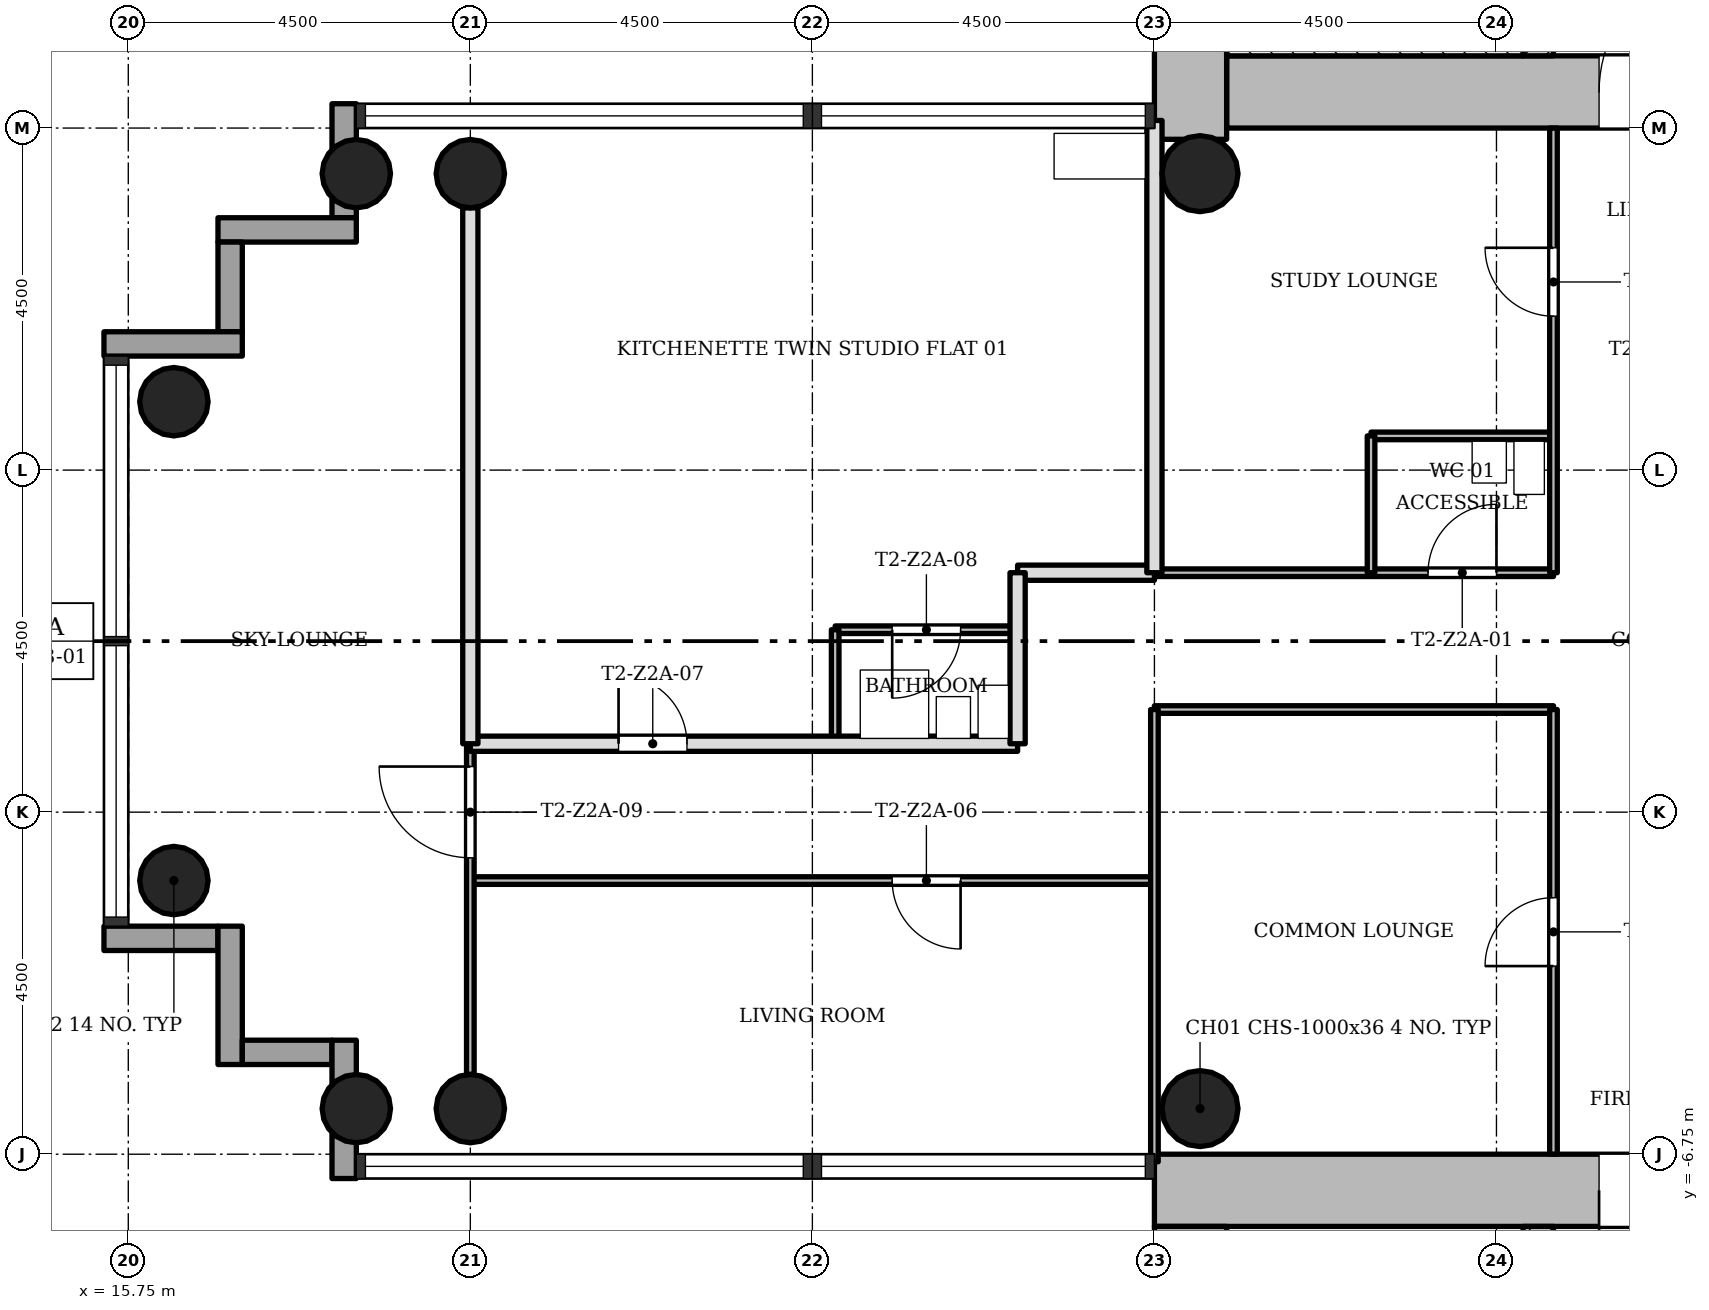
"""IFC4 building model, lengths in metres.
Left out: names, types, materials, properties, quantities, classifications, styles, units other than length and angle.
Written with IfcOpenShell. Run it as: python <this file> out.ifc"""

import sys

from ifc_helpers import new_model, si_unit, direction, frame, frame_2d, origin, origin_2d, place, context, subcontext, project, spatial, rectangle, hollow_circle, extrude, element, fill, save


model = new_model("IFC4")
c1 = context("Model", 3, precision=1e-05, world=origin(), true_north=direction((0.0, 1.0)))
c2 = subcontext(c1, "Body", "Model", "MODEL_VIEW")
j1 = project(units=[si_unit("LENGTHUNIT", "METRE"), si_unit("PLANEANGLEUNIT", "RADIAN")], contexts=[c1])
p1 = place(None, origin())
s1 = spatial("IfcSite", under=j1, at=p1, CompositionType="ELEMENT")
p2 = place(p1, origin())
s2 = spatial("IfcBuilding", under=s1, at=p2, CompositionType="ELEMENT")
p3 = place(p2, frame((0.0, 0.0, 117.4)))
s3 = spatial("IfcBuildingStorey", under=s2, at=p3, CompositionType="ELEMENT", Elevation=117.4)
p4 = place(p3, frame((30.2, 7.225, 0.0), z_axis=(0.0, 0.0, 1.0), x_axis=(1.0, 0.0, 0.0)))
e1 = element("IfcWall", 1, at=p4, inside=s3, PredefinedType="SHEAR", context=c2, shape_type="SweptSolid", body=[
    extrude(rectangle(XDim=12.55, YDim=0.95, at=frame_2d((6.275, 0.0))), origin(), (0.0, 0.0, 1.0), 3.4),
])
p5 = place(p4, frame((4.9, 0.0, 0.0)))
e2 = element("IfcOpeningElement", 2, at=p5, cuts=e1, PredefinedType="OPENING", context=c2, shape_type="SweptSolid", body=[
    extrude(rectangle(XDim=1.8, YDim=2.1, at=frame_2d((0.9, 1.05))), frame((0.0, 0.485, 0.0), z_axis=(0.0, -1.0, 0.0), x_axis=(1.0, 0.0, 0.0)), (0.0, 0.0, 1.0), 0.97),
])
p6 = place(p3, frame((29.725, 15.298, 0.0), z_axis=(0.0, 0.0, 1.0), x_axis=(0.0, -1.0, 0.0)))
e3 = element("IfcWall", 3, at=p6, inside=s3, PredefinedType="SHEAR", context=c2, shape_type="SweptSolid", body=[
    extrude(rectangle(XDim=8.696, YDim=0.95, at=frame_2d((4.348, 0.0))), origin(), (0.0, 0.0, 1.0), 3.4),
])
p7 = place(p3, frame((34.3, 7.7, 0.0), z_axis=(0.0, 0.0, 1.0), x_axis=(0.0, 1.0, 0.0)))
e4 = element("IfcWall", 4, at=p7, inside=s3, PredefinedType="SHEAR", context=c2, shape_type="SweptSolid", body=[
    extrude(rectangle(XDim=7.1, YDim=0.4, at=frame_2d((3.55, 0.0))), origin(), (0.0, 0.0, 1.0), 3.4),
])
p8 = place(p7, frame((0.7, 0.0, 0.0)))
e5 = element("IfcOpeningElement", 5, at=p8, cuts=e4, PredefinedType="OPENING", context=c2, shape_type="SweptSolid", body=[
    extrude(rectangle(XDim=0.9, YDim=2.1, at=frame_2d((0.45, 1.05))), frame((0.0, 0.21, 0.0), z_axis=(0.0, -1.0, 0.0), x_axis=(1.0, 0.0, 0.0)), (0.0, 0.0, 1.0), 0.42),
])
p9 = place(p3, frame((41.8, -7.225, 0.0), z_axis=(0.0, 0.0, 1.0), x_axis=(-1.0, 0.0, 0.0)))
e6 = element("IfcWall", 6, at=p9, inside=s3, PredefinedType="SHEAR", context=c2, shape_type="SweptSolid", body=[
    extrude(rectangle(XDim=12.55, YDim=0.95, at=frame_2d((6.275, 0.0))), origin(), (0.0, 0.0, 1.0), 3.4),
])
p10 = place(p9, frame((4.9, 0.0, 0.0)))
e7 = element("IfcOpeningElement", 7, at=p10, cuts=e6, PredefinedType="OPENING", context=c2, shape_type="SweptSolid", body=[
    extrude(rectangle(XDim=1.8, YDim=2.1, at=frame_2d((0.9, 1.05))), frame((0.0, 0.485, 0.0), z_axis=(0.0, -1.0, 0.0), x_axis=(1.0, 0.0, 0.0)), (0.0, 0.0, 1.0), 0.97),
])
p11 = place(p3, frame((29.725, -7.7, 0.0), z_axis=(0.0, 0.0, 1.0), x_axis=(0.0, -1.0, 0.0)))
e8 = element("IfcWall", 8, at=p11, inside=s3, PredefinedType="SHEAR", context=c2, shape_type="SweptSolid", body=[
    extrude(rectangle(XDim=8.05, YDim=0.95, at=frame_2d((4.025, 0.0))), origin(), (0.0, 0.0, 1.0), 3.4),
])
p12 = place(p3, frame((34.3, -14.8, 0.0), z_axis=(0.0, 0.0, 1.0), x_axis=(0.0, 1.0, 0.0)))
e9 = element("IfcWall", 9, at=p12, inside=s3, PredefinedType="SHEAR", context=c2, shape_type="SweptSolid", body=[
    extrude(rectangle(XDim=7.1, YDim=0.4, at=frame_2d((3.55, 0.0))), origin(), (0.0, 0.0, 1.0), 3.4),
])
p13 = place(p12, frame((5.2, 0.0, 0.0)))
e10 = element("IfcOpeningElement", 10, at=p13, cuts=e9, PredefinedType="OPENING", context=c2, shape_type="SweptSolid", body=[
    extrude(rectangle(XDim=1.1, YDim=2.1, at=frame_2d((0.55, 1.05))), frame((0.0, 0.21, 0.0), z_axis=(0.0, -1.0, 0.0), x_axis=(1.0, 0.0, 0.0)), (0.0, 0.0, 1.0), 0.42),
])
for number, where, z_axis, x_axis in (
    (11, (20.25, 6.15, 0.0), (0.0, 0.0, 1.0), (1.0, 0.0, 0.0)),
    (12, (20.25, -6.15, 0.0), (0.0, 0.0, 1.0), (1.0, 0.0, 0.0)),
    (13, (18.75, 6.15, 0.0), (0.0, 0.0, 1.0), (1.0, 0.0, 0.0)),
    (14, (18.75, -6.15, 0.0), (0.0, 0.0, 1.0), (1.0, 0.0, 0.0)),
    (15, (16.35, 3.15, 0.0), (0.0, 0.0, 1.0), (1.0, 0.0, 0.0)),
    (16, (16.35, -3.15, 0.0), (0.0, 0.0, 1.0), (1.0, 0.0, 0.0)),
):
    element("IfcColumn", number, at=place(p3, frame(where, z_axis=z_axis, x_axis=x_axis)), inside=s3, PredefinedType="COLUMN", context=c2, shape_type="SweptSolid", body=[
        extrude(hollow_circle(Radius=0.45, WallThickness=0.032, at=origin_2d()), origin(), (0.0, 0.0, 1.0), 3.4),
    ])
for number, where, z_axis, x_axis in (
    (17, (29.85, 6.15, 0.0), (0.0, 0.0, 1.0), (1.0, 0.0, 0.0)),
    (18, (29.85, -6.15, 0.0), (0.0, 0.0, 1.0), (1.0, 0.0, 0.0)),
):
    element("IfcColumn", number, at=place(p3, frame(where, z_axis=z_axis, x_axis=x_axis)), inside=s3, PredefinedType="COLUMN", context=c2, shape_type="SweptSolid", body=[
        extrude(hollow_circle(Radius=0.5, WallThickness=0.036, at=origin_2d()), origin(), (0.0, 0.0, 1.0), 3.4),
    ])
p14 = place(p3, frame((18.59, 7.07, -0.3), z_axis=(0.0, 0.0, 1.0), x_axis=(0.0, -1.0, 0.0)))
e19 = element("IfcWall", 19, at=p14, inside=s3, PredefinedType="STANDARD", context=c2, shape_type="SweptSolid", body=[
    extrude(rectangle(XDim=1.5, YDim=0.32, at=frame_2d((0.75, 0.0))), origin(), (0.0, 0.0, 1.0), 3.4),
])
p15 = place(p3, frame((18.75, 5.41, -0.3), z_axis=(0.0, 0.0, 1.0), x_axis=(-1.0, 0.0, 0.0)))
e20 = element("IfcWall", 20, at=p15, inside=s3, PredefinedType="STANDARD", context=c2, shape_type="SweptSolid", body=[
    extrude(rectangle(XDim=1.82, YDim=0.32, at=frame_2d((0.91, 0.0))), origin(), (0.0, 0.0, 1.0), 3.4),
])
p16 = place(p3, frame((17.09, 5.25, -0.3), z_axis=(0.0, 0.0, 1.0), x_axis=(0.0, -1.0, 0.0)))
e21 = element("IfcWall", 21, at=p16, inside=s3, PredefinedType="STANDARD", context=c2, shape_type="SweptSolid", body=[
    extrude(rectangle(XDim=1.18, YDim=0.32, at=frame_2d((0.59, 0.0))), origin(), (0.0, 0.0, 1.0), 3.4),
])
p17 = place(p3, frame((17.25, 3.91, -0.3), z_axis=(0.0, 0.0, 1.0), x_axis=(-1.0, 0.0, 0.0)))
e22 = element("IfcWall", 22, at=p17, inside=s3, PredefinedType="STANDARD", context=c2, shape_type="SweptSolid", body=[
    extrude(rectangle(XDim=1.82, YDim=0.32, at=frame_2d((0.91, 0.0))), origin(), (0.0, 0.0, 1.0), 3.4),
])
p18 = place(p3, frame((15.43, -3.91, -0.3), z_axis=(0.0, 0.0, 1.0), x_axis=(1.0, 0.0, 0.0)))
e23 = element("IfcWall", 23, at=p18, inside=s3, PredefinedType="STANDARD", context=c2, shape_type="SweptSolid", body=[
    extrude(rectangle(XDim=1.5, YDim=0.32, at=frame_2d((0.75, 0.0))), origin(), (0.0, 0.0, 1.0), 3.4),
])
p19 = place(p3, frame((17.09, -3.75, -0.3), z_axis=(0.0, 0.0, 1.0), x_axis=(0.0, -1.0, 0.0)))
e24 = element("IfcWall", 24, at=p19, inside=s3, PredefinedType="STANDARD", context=c2, shape_type="SweptSolid", body=[
    extrude(rectangle(XDim=1.82, YDim=0.32, at=frame_2d((0.91, 0.0))), origin(), (0.0, 0.0, 1.0), 3.4),
])
p20 = place(p3, frame((17.25, -5.41, -0.3), z_axis=(0.0, 0.0, 1.0), x_axis=(1.0, 0.0, 0.0)))
e25 = element("IfcWall", 25, at=p20, inside=s3, PredefinedType="STANDARD", context=c2, shape_type="SweptSolid", body=[
    extrude(rectangle(XDim=1.18, YDim=0.32, at=frame_2d((0.59, 0.0))), origin(), (0.0, 0.0, 1.0), 3.4),
])
p21 = place(p3, frame((18.59, -5.25, -0.3), z_axis=(0.0, 0.0, 1.0), x_axis=(0.0, -1.0, 0.0)))
e26 = element("IfcWall", 26, at=p21, inside=s3, PredefinedType="STANDARD", context=c2, shape_type="SweptSolid", body=[
    extrude(rectangle(XDim=1.82, YDim=0.32, at=frame_2d((0.91, 0.0))), origin(), (0.0, 0.0, 1.0), 3.4),
])
p22 = place(p3, frame((29.25, -3.15, 0.0), z_axis=(0.0, 0.0, 1.0), x_axis=(-1.0, 0.0, 0.0)))
e27 = element("IfcWall", 27, at=p22, inside=s3, PredefinedType="PARTITIONING", context=c2, shape_type="SweptSolid", body=[
    extrude(rectangle(XDim=9.0, YDim=0.1, at=frame_2d((4.5, 0.0))), origin(), (0.0, 0.0, 1.0), 3.0),
])
p23 = place(p22, frame((2.55, 0.0, 0.0)))
e28 = element("IfcOpeningElement", 28, at=p23, cuts=e27, PredefinedType="OPENING", context=c2, shape_type="SweptSolid", body=[
    extrude(rectangle(XDim=0.9, YDim=2.1, at=frame_2d((0.45, 1.05))), frame((0.0, 0.06, 0.0), z_axis=(0.0, -1.0, 0.0), x_axis=(1.0, 0.0, 0.0)), (0.0, 0.0, 1.0), 0.12),
])
p24 = place(p3, frame((27.45, -1.35, 0.0), z_axis=(0.0, 0.0, 1.0), x_axis=(-1.0, 0.0, 0.0)))
e29 = element("IfcWall", 29, at=p24, inside=s3, PredefinedType="SOLIDWALL", context=c2, shape_type="SweptSolid", body=[
    extrude(rectangle(XDim=7.2, YDim=0.2, at=frame_2d((3.6, 0.0))), origin(), (0.0, 0.0, 1.0), 3.0),
])
p25 = place(p24, frame((4.35, 0.0, 0.0)))
e30 = element("IfcOpeningElement", 30, at=p25, cuts=e29, PredefinedType="OPENING", context=c2, shape_type="SweptSolid", body=[
    extrude(rectangle(XDim=0.9, YDim=2.1, at=frame_2d((0.45, 1.05))), frame((0.0, 0.11, 0.0), z_axis=(0.0, -1.0, 0.0), x_axis=(1.0, 0.0, 0.0)), (0.0, 0.0, 1.0), 0.22),
])
p26 = place(p3, frame((34.5, -0.9, 0.0), z_axis=(0.0, 0.0, 1.0), x_axis=(-1.0, 0.0, 0.0)))
e31 = element("IfcWall", 31, at=p26, inside=s3, PredefinedType="PARTITIONING", context=c2, shape_type="SweptSolid", body=[
    extrude(rectangle(XDim=5.25, YDim=0.1, at=frame_2d((2.625, 0.0))), origin(), (0.0, 0.0, 1.0), 3.0),
])
p27 = place(p3, frame((27.45, 0.15, 0.0), z_axis=(0.0, 0.0, 1.0), x_axis=(-1.0, 0.0, 0.0)))
e32 = element("IfcWall", 32, at=p27, inside=s3, PredefinedType="PARTITIONING", context=c2, shape_type="SweptSolid", body=[
    extrude(rectangle(XDim=2.4, YDim=0.1, at=frame_2d((1.2, 0.0))), origin(), (0.0, 0.0, 1.0), 3.0),
])
p28 = place(p27, frame((0.75, 0.0, 0.0)))
e33 = element("IfcOpeningElement", 33, at=p28, cuts=e32, PredefinedType="OPENING", context=c2, shape_type="SweptSolid", body=[
    extrude(rectangle(XDim=0.9, YDim=2.1, at=frame_2d((0.45, 1.05))), frame((0.0, 0.06, 0.0), z_axis=(0.0, -1.0, 0.0), x_axis=(1.0, 0.0, 0.0)), (0.0, 0.0, 1.0), 0.12),
])
p29 = place(p3, frame((34.5, 0.9, 0.0), z_axis=(0.0, 0.0, 1.0), x_axis=(-1.0, 0.0, 0.0)))
e34 = element("IfcWall", 34, at=p29, inside=s3, PredefinedType="PARTITIONING", context=c2, shape_type="SweptSolid", body=[
    extrude(rectangle(XDim=5.25, YDim=0.1, at=frame_2d((2.625, 0.0))), origin(), (0.0, 0.0, 1.0), 3.0),
])
p30 = place(p29, frame((0.75, 0.0, 0.0)))
e35 = element("IfcOpeningElement", 35, at=p30, cuts=e34, PredefinedType="OPENING", context=c2, shape_type="SweptSolid", body=[
    extrude(rectangle(XDim=0.9, YDim=2.1, at=frame_2d((0.45, 1.05))), frame((0.0, 0.06, 0.0), z_axis=(0.0, -1.0, 0.0), x_axis=(1.0, 0.0, 0.0)), (0.0, 0.0, 1.0), 0.12),
])
p31 = place(p3, frame((29.25, 0.9, 0.0), z_axis=(0.0, 0.0, 1.0), x_axis=(-1.0, 0.0, 0.0)))
e36 = element("IfcWall", 36, at=p31, inside=s3, PredefinedType="SOLIDWALL", context=c2, shape_type="SweptSolid", body=[
    extrude(rectangle(XDim=1.8, YDim=0.2, at=frame_2d((0.9, 0.0))), origin(), (0.0, 0.0, 1.0), 3.0),
])
p32 = place(p3, frame((34.5, 2.7, 0.0), z_axis=(0.0, 0.0, 1.0), x_axis=(-1.0, 0.0, 0.0)))
e37 = element("IfcWall", 37, at=p32, inside=s3, PredefinedType="PARTITIONING", context=c2, shape_type="SweptSolid", body=[
    extrude(rectangle(XDim=2.4, YDim=0.1, at=frame_2d((1.2, 0.0))), origin(), (0.0, 0.0, 1.0), 3.0),
])
p33 = place(p3, frame((34.5, -6.75, 0.0), z_axis=(0.0, 0.0, 1.0), x_axis=(0.0, 1.0, 0.0)))
e38 = element("IfcWall", 38, at=p33, inside=s3, PredefinedType="PARTITIONING", context=c2, shape_type="SweptSolid", body=[
    extrude(rectangle(XDim=5.85, YDim=0.1, at=frame_2d((2.925, 0.0))), origin(), (0.0, 0.0, 1.0), 3.0),
])
p34 = place(p33, frame((2.475, 0.0, 0.0)))
e39 = element("IfcOpeningElement", 39, at=p34, cuts=e38, PredefinedType="OPENING", context=c2, shape_type="SweptSolid", body=[
    extrude(rectangle(XDim=0.9, YDim=2.1, at=frame_2d((0.45, 1.05))), frame((0.0, 0.06, 0.0), z_axis=(0.0, -1.0, 0.0), x_axis=(1.0, 0.0, 0.0)), (0.0, 0.0, 1.0), 0.12),
])
p35 = place(p3, frame((34.5, 0.9, 0.0), z_axis=(0.0, 0.0, 1.0), x_axis=(0.0, 1.0, 0.0)))
e40 = element("IfcWall", 40, at=p35, inside=s3, PredefinedType="PARTITIONING", context=c2, shape_type="SweptSolid", body=[
    extrude(rectangle(XDim=5.85, YDim=0.1, at=frame_2d((2.925, 0.0))), origin(), (0.0, 0.0, 1.0), 3.0),
])
p36 = place(p35, frame((3.375, 0.0, 0.0)))
e41 = element("IfcOpeningElement", 41, at=p36, cuts=e40, PredefinedType="OPENING", context=c2, shape_type="SweptSolid", body=[
    extrude(rectangle(XDim=0.9, YDim=2.1, at=frame_2d((0.45, 1.05))), frame((0.0, 0.06, 0.0), z_axis=(0.0, -1.0, 0.0), x_axis=(1.0, 0.0, 0.0)), (0.0, 0.0, 1.0), 0.12),
])
p37 = place(p3, frame((32.1, 0.9, 0.0), z_axis=(0.0, 0.0, 1.0), x_axis=(0.0, 1.0, 0.0)))
e42 = element("IfcWall", 42, at=p37, inside=s3, PredefinedType="PARTITIONING", context=c2, shape_type="SweptSolid", body=[
    extrude(rectangle(XDim=1.8, YDim=0.1, at=frame_2d((0.9, 0.0))), origin(), (0.0, 0.0, 1.0), 3.0),
])
p38 = place(p3, frame((29.25, -6.85, 0.0), z_axis=(0.0, 0.0, 1.0), x_axis=(0.0, 1.0, 0.0)))
e43 = element("IfcWall", 43, at=p38, inside=s3, PredefinedType="PARTITIONING", context=c2, shape_type="SweptSolid", body=[
    extrude(rectangle(XDim=5.95, YDim=0.1, at=frame_2d((2.975, 0.0))), origin(), (0.0, 0.0, 1.0), 3.0),
])
p39 = place(p3, frame((29.25, 0.9, 0.0), z_axis=(0.0, 0.0, 1.0), x_axis=(0.0, 1.0, 0.0)))
e44 = element("IfcWall", 44, at=p39, inside=s3, PredefinedType="SOLIDWALL", context=c2, shape_type="SweptSolid", body=[
    extrude(rectangle(XDim=5.95, YDim=0.2, at=frame_2d((2.975, 0.0))), origin(), (0.0, 0.0, 1.0), 3.0),
])
p40 = place(p3, frame((27.45, -1.35, 0.0), z_axis=(0.0, 0.0, 1.0), x_axis=(0.0, 1.0, 0.0)))
e45 = element("IfcWall", 45, at=p40, inside=s3, PredefinedType="SOLIDWALL", context=c2, shape_type="SweptSolid", body=[
    extrude(rectangle(XDim=2.25, YDim=0.2, at=frame_2d((1.125, 0.0))), origin(), (0.0, 0.0, 1.0), 3.0),
])
p41 = place(p3, frame((25.05, -1.35, 0.0), z_axis=(0.0, 0.0, 1.0), x_axis=(0.0, 1.0, 0.0)))
e46 = element("IfcWall", 46, at=p41, inside=s3, PredefinedType="PARTITIONING", context=c2, shape_type="SweptSolid", body=[
    extrude(rectangle(XDim=1.5, YDim=0.1, at=frame_2d((0.75, 0.0))), origin(), (0.0, 0.0, 1.0), 3.0),
])
p42 = place(p3, frame((20.25, -5.7, 0.0), z_axis=(0.0, 0.0, 1.0), x_axis=(0.0, 1.0, 0.0)))
e47 = element("IfcWall", 47, at=p42, inside=s3, PredefinedType="PARTITIONING", context=c2, shape_type="SweptSolid", body=[
    extrude(rectangle(XDim=4.35, YDim=0.1, at=frame_2d((2.175, 0.0))), origin(), (0.0, 0.0, 1.0), 3.0),
])
p43 = place(p42, frame((2.85, 0.0, 0.0)))
e48 = element("IfcOpeningElement", 48, at=p43, cuts=e47, PredefinedType="OPENING", context=c2, shape_type="SweptSolid", body=[
    extrude(rectangle(XDim=1.2, YDim=2.1, at=frame_2d((0.6, 1.05))), frame((0.0, 0.06, 0.0), z_axis=(0.0, -1.0, 0.0), x_axis=(1.0, 0.0, 0.0)), (0.0, 0.0, 1.0), 0.12),
])
p44 = place(p3, frame((20.25, -1.35, 0.0), z_axis=(0.0, 0.0, 1.0), x_axis=(0.0, 1.0, 0.0)))
e49 = element("IfcWall", 49, at=p44, inside=s3, PredefinedType="SOLIDWALL", context=c2, shape_type="SweptSolid", body=[
    extrude(rectangle(XDim=7.05, YDim=0.2, at=frame_2d((3.525, 0.0))), origin(), (0.0, 0.0, 1.0), 3.0),
])
p45 = place(p3, frame((34.1, 7.825, 0.0), z_axis=(0.0, 0.0, 1.0), x_axis=(-1.0, 0.0, 0.0)))
e50 = element("IfcWall", 50, at=p45, inside=s3, PredefinedType="SHEAR", context=c2, shape_type="SweptSolid", body=[
    extrude(rectangle(XDim=3.9, YDim=0.25, at=frame_2d((1.95, 0.0))), origin(), (0.0, 0.0, 1.0), 3.4),
])
p46 = place(p30, origin())
e51 = element("IfcDoor", 51, at=p46, inside=s3, OperationType="SINGLE_SWING_LEFT", PredefinedType="DOOR", context=c2, shape_type="SweptSolid", body=[
    extrude(rectangle(XDim=0.9, YDim=2.1, at=frame_2d((0.45, 1.05))), frame((0.0, 0.025, 0.0), z_axis=(0.0, -1.0, 0.0), x_axis=(1.0, 0.0, 0.0)), (0.0, 0.0, 1.0), 0.05),
])
fill(e35, e51)
p47 = place(p36, origin())
e52 = element("IfcDoor", 52, at=p47, inside=s3, OperationType="SINGLE_SWING_LEFT", PredefinedType="DOOR", context=c2, shape_type="SweptSolid", body=[
    extrude(rectangle(XDim=0.9, YDim=2.1, at=frame_2d((0.45, 1.05))), frame((0.0, 0.025, 0.0), z_axis=(0.0, -1.0, 0.0), x_axis=(1.0, 0.0, 0.0)), (0.0, 0.0, 1.0), 0.05),
])
fill(e41, e52)
p48 = place(p34, origin())
e53 = element("IfcDoor", 53, at=p48, inside=s3, OperationType="SINGLE_SWING_RIGHT", PredefinedType="DOOR", context=c2, shape_type="SweptSolid", body=[
    extrude(rectangle(XDim=0.9, YDim=2.1, at=frame_2d((0.45, 1.05))), frame((0.0, 0.025, 0.0), z_axis=(0.0, -1.0, 0.0), x_axis=(1.0, 0.0, 0.0)), (0.0, 0.0, 1.0), 0.05),
])
fill(e39, e53)
p49 = place(p23, origin())
e54 = element("IfcDoor", 54, at=p49, inside=s3, OperationType="SINGLE_SWING_RIGHT", PredefinedType="DOOR", context=c2, shape_type="SweptSolid", body=[
    extrude(rectangle(XDim=0.9, YDim=2.1, at=frame_2d((0.45, 1.05))), frame((0.0, 0.025, 0.0), z_axis=(0.0, -1.0, 0.0), x_axis=(1.0, 0.0, 0.0)), (0.0, 0.0, 1.0), 0.05),
])
fill(e28, e54)
p50 = place(p25, origin())
e55 = element("IfcDoor", 55, at=p50, inside=s3, OperationType="SINGLE_SWING_RIGHT", PredefinedType="DOOR", context=c2, shape_type="SweptSolid", body=[
    extrude(rectangle(XDim=0.9, YDim=2.1, at=frame_2d((0.45, 1.05))), frame((0.0, 0.025, 0.0), z_axis=(0.0, -1.0, 0.0), x_axis=(1.0, 0.0, 0.0)), (0.0, 0.0, 1.0), 0.05),
])
fill(e30, e55)
p51 = place(p28, origin())
e56 = element("IfcDoor", 56, at=p51, inside=s3, OperationType="SINGLE_SWING_LEFT", PredefinedType="DOOR", context=c2, shape_type="SweptSolid", body=[
    extrude(rectangle(XDim=0.9, YDim=2.1, at=frame_2d((0.45, 1.05))), frame((0.0, 0.025, 0.0), z_axis=(0.0, -1.0, 0.0), x_axis=(1.0, 0.0, 0.0)), (0.0, 0.0, 1.0), 0.05),
])
fill(e33, e56)
p52 = place(p43, origin())
e57 = element("IfcDoor", 57, at=p52, inside=s3, OperationType="SINGLE_SWING_LEFT", PredefinedType="DOOR", context=c2, shape_type="SweptSolid", body=[
    extrude(rectangle(XDim=1.2, YDim=2.1, at=frame_2d((0.6, 1.05))), frame((0.0, 0.025, 0.0), z_axis=(0.0, -1.0, 0.0), x_axis=(1.0, 0.0, 0.0)), (0.0, 0.0, 1.0), 0.05),
])
fill(e48, e57)
p53 = place(p5, origin())
e58 = element("IfcDoor", 58, at=p53, inside=s3, OperationType="SINGLE_SWING_LEFT", PredefinedType="DOOR", context=c2, shape_type="SweptSolid", body=[
    extrude(rectangle(XDim=1.8, YDim=2.1, at=frame_2d((0.9, 1.05))), frame((0.0, 0.025, 0.0), z_axis=(0.0, -1.0, 0.0), x_axis=(1.0, 0.0, 0.0)), (0.0, 0.0, 1.0), 0.05),
])
fill(e2, e58)
p54 = place(p10, origin())
e59 = element("IfcDoor", 59, at=p54, inside=s3, OperationType="SINGLE_SWING_LEFT", PredefinedType="DOOR", context=c2, shape_type="SweptSolid", body=[
    extrude(rectangle(XDim=1.8, YDim=2.1, at=frame_2d((0.9, 1.05))), frame((0.0, 0.025, 0.0), z_axis=(0.0, -1.0, 0.0), x_axis=(1.0, 0.0, 0.0)), (0.0, 0.0, 1.0), 0.05),
])
fill(e7, e59)
save(model, sys.argv[1])
